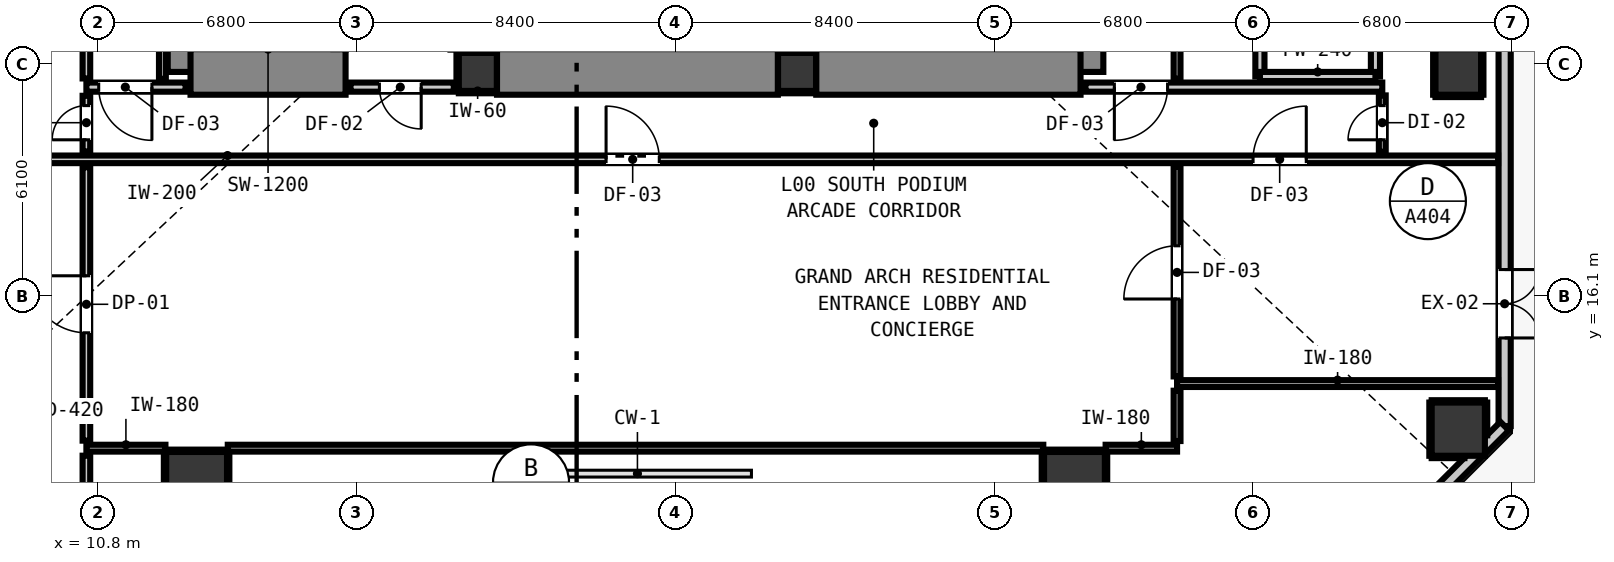
"""IFC4 building model, lengths in metres.
Left out: names, types, materials, properties, quantities, classifications, styles, units other than length and angle.
Written with IfcOpenShell. Run it as: python <this file> out.ifc"""

import sys

from ifc_helpers import new_model, si_unit, direction, frame, frame_2d, origin, origin_2d, place, context, subcontext, project, spatial, rectangle, circle, extrude, element, fill, save


model = new_model("IFC4")
c1 = context("Model", 3, precision=1e-05, world=origin(), true_north=direction((0.0, 1.0)))
c2 = subcontext(c1, "Body", "Model", "MODEL_VIEW")
j1 = project(units=[si_unit("LENGTHUNIT", "METRE"), si_unit("PLANEANGLEUNIT", "RADIAN")], contexts=[c1])
p1 = place(None, origin())
s1 = spatial("IfcSite", under=j1, at=p1, CompositionType="ELEMENT")
p2 = place(p1, origin())
s2 = spatial("IfcBuilding", under=s1, at=p2, CompositionType="ELEMENT")
p3 = place(p2, origin())
s3 = spatial("IfcBuildingStorey", under=s2, at=p3, CompositionType="ELEMENT", Elevation=0.0)
for number, where, z_axis, x_axis in (
    (1, (20.8, 22.0, 0.0), (0.0, 0.0, 1.0), (1.0, 0.0, 0.0)),
    (2, (29.2, 22.0, 0.0), (0.0, 0.0, 1.0), (1.0, 0.0, 0.0)),
):
    element("IfcColumn", number, at=place(p3, frame(where, z_axis=z_axis, x_axis=x_axis)), inside=s3, PredefinedType="COLUMN", context=c2, shape_type="SweptSolid", body=[
        extrude(rectangle(XDim=1.0, YDim=1.0, at=origin_2d()), origin(), (0.0, 0.0, 1.0), 5.2),
    ])
p4 = place(p3, frame((13.24, 22.0, 0.0), z_axis=(0.0, 0.0, 1.0), x_axis=(0.0, 1.0, 0.0)))
e3 = element("IfcWall", 3, at=p4, inside=s3, PredefinedType="SHEAR", context=c2, shape_type="SweptSolid", body=[
    extrude(rectangle(XDim=8.195, YDim=1.2, at=frame_2d((4.098, 0.0))), origin(), (0.0, 0.0, 1.0), 5.2),
])
p5 = place(p3, frame((13.24, 22.0, 0.0), z_axis=(0.0, 0.0, 1.0), x_axis=(1.0, 0.0, 0.0)))
e4 = element("IfcWall", 4, at=p5, inside=s3, PredefinedType="SHEAR", context=c2, shape_type="SweptSolid", body=[
    extrude(rectangle(XDim=4.08, YDim=1.2, at=frame_2d((2.04, 0.0))), origin(), (0.0, 0.0, 1.0), 5.2),
])
p6 = place(p3, frame((36.66, 22.0, 0.0), z_axis=(0.0, 0.0, 1.0), x_axis=(0.0, 1.0, 0.0)))
e5 = element("IfcWall", 5, at=p6, inside=s3, PredefinedType="SHEAR", context=c2, shape_type="SweptSolid", body=[
    extrude(rectangle(XDim=8.195, YDim=1.2, at=frame_2d((4.098, 0.0))), origin(), (0.0, 0.0, 1.0), 5.2),
])
p7 = place(p3, frame((29.705, 22.0, 0.0), z_axis=(0.0, 0.0, 1.0), x_axis=(1.0, 0.0, 0.0)))
e6 = element("IfcWall", 6, at=p7, inside=s3, PredefinedType="SHEAR", context=c2, shape_type="SweptSolid", body=[
    extrude(rectangle(XDim=6.955, YDim=1.2, at=frame_2d((3.478, 0.0))), origin(), (0.0, 0.0, 1.0), 5.2),
])
p8 = place(p3, frame((21.305, 22.0, 0.0), z_axis=(0.0, 0.0, 1.0), x_axis=(1.0, 0.0, 0.0)))
e7 = element("IfcWall", 7, at=p8, inside=s3, PredefinedType="SHEAR", context=c2, shape_type="SweptSolid", body=[
    extrude(rectangle(XDim=7.39, YDim=1.2, at=frame_2d((3.695, 0.0))), origin(), (0.0, 0.0, 1.0), 5.2),
])
for number, where, z_axis, x_axis in (
    (8, (13.4, 11.2, 0.0), (0.0, 0.0, 1.0), (1.0, 0.0, 0.0)),
    (9, (36.5, 11.2, 0.0), (0.0, 0.0, 1.0), (1.0, 0.0, 0.0)),
):
    element("IfcColumn", number, at=place(p3, frame(where, z_axis=z_axis, x_axis=x_axis)), inside=s3, PredefinedType="COLUMN", context=c2, shape_type="SweptSolid", body=[
        extrude(rectangle(XDim=1.6, YDim=1.6, at=origin_2d()), origin(), (0.0, 0.0, 1.0), 5.2),
    ])
p9 = place(p3, frame((46.6, 22.0, 0.0), z_axis=(0.0, 0.0, 1.0), x_axis=(1.0, 0.0, 0.0)))
e10 = element("IfcColumn", 10, at=p9, inside=s3, PredefinedType="COLUMN", context=c2, shape_type="SweptSolid", body=[
    extrude(circle(Radius=0.6, at=origin_2d()), origin(), (0.0, 0.0, 1.0), 5.2),
])
p10 = place(p3, frame((46.6, 12.6, 0.0), z_axis=(0.0, 0.0, 1.0), x_axis=(1.0, 0.0, 0.0)))
e11 = element("IfcColumn", 11, at=p10, inside=s3, PredefinedType="COLUMN", context=c2, shape_type="SweptSolid", body=[
    extrude(rectangle(XDim=1.4, YDim=1.4, at=origin_2d()), origin(), (0.0, 0.0, 1.0), 5.2),
])
p11 = place(p3, frame((47.82, 23.0, 0.0), z_axis=(0.0, 0.0, 1.0), x_axis=(0.0, -1.0, 0.0)))
e12 = element("IfcWall", 12, at=p11, inside=s3, PredefinedType="STANDARD", context=c2, shape_type="SweptSolid", body=[
    extrude(rectangle(XDim=10.32, YDim=0.32, at=frame_2d((5.16, 0.0))), origin(), (0.0, 0.0, 1.0), 4.92),
])
p12 = place(p11, frame((6.2, 0.0, 0.0)))
e13 = element("IfcOpeningElement", 13, at=p12, cuts=e12, PredefinedType="OPENING", context=c2, shape_type="SweptSolid", body=[
    extrude(rectangle(XDim=1.8, YDim=2.4, at=frame_2d((0.9, 1.2))), frame((0.0, 0.17, 0.0), z_axis=(0.0, -1.0, 0.0), x_axis=(1.0, 0.0, 0.0)), (0.0, 0.0, 1.0), 0.34),
])
p13 = place(p3, frame((47.82, 12.68, 0.0), z_axis=(0.0, 0.0, 1.0), x_axis=(-0.707106781187, -0.707106781187, 0.0)))
e14 = element("IfcWall", 14, at=p13, inside=s3, PredefinedType="STANDARD", context=c2, shape_type="SweptSolid", body=[
    extrude(rectangle(XDim=3.536, YDim=0.32, at=frame_2d((1.768, 0.0))), origin(), (0.0, 0.0, 1.0), 4.92),
])
for number, where, z_axis, x_axis in (
    (15, (41.38, 21.88, 0.0), (0.0, 0.0, 1.0), (0.0, 1.0, 0.0)),
    (16, (44.42, 21.88, 0.0), (0.0, 0.0, 1.0), (0.0, 1.0, 0.0)),
):
    element("IfcWall", number, at=place(p3, frame(where, z_axis=z_axis, x_axis=x_axis)), inside=s3, PredefinedType="PARAPET", context=c2, shape_type="SweptSolid", body=[
        extrude(rectangle(XDim=28.77, YDim=0.24, at=frame_2d((14.385, 0.0))), origin(), (0.0, 0.0, 1.0), 1.2),
    ])
p14 = place(p3, frame((41.38, 21.88, 0.0), z_axis=(0.0, 0.0, 1.0), x_axis=(1.0, 0.0, 0.0)))
e17 = element("IfcWall", 17, at=p14, inside=s3, PredefinedType="PARAPET", context=c2, shape_type="SweptSolid", body=[
    extrude(rectangle(XDim=3.04, YDim=0.24, at=frame_2d((1.52, 0.0))), origin(), (0.0, 0.0, 1.0), 1.2),
])
p15 = place(p3, frame((44.6, 21.6, 0.0), z_axis=(0.0, 0.0, 1.0), x_axis=(-1.0, 0.0, 0.0)))
e18 = element("IfcWall", 18, at=p15, inside=s3, PredefinedType="PARTITIONING", context=c2, shape_type="SweptSolid", body=[
    extrude(rectangle(XDim=7.81, YDim=0.24, at=frame_2d((3.905, 0.0))), origin(), (0.0, 0.0, 1.0), 4.155),
])
p16 = place(p15, frame((5.65, 0.0, 0.0)))
e19 = element("IfcOpeningElement", 19, at=p16, cuts=e18, PredefinedType="OPENING", context=c2, shape_type="SweptSolid", body=[
    extrude(rectangle(XDim=1.4, YDim=2.15, at=frame_2d((0.7, 1.075))), frame((0.0, 0.13, 0.0), z_axis=(0.0, -1.0, 0.0), x_axis=(1.0, 0.0, 0.0)), (0.0, 0.0, 1.0), 0.26),
])
p17 = place(p3, frame((20.168, 21.6, 0.0), z_axis=(0.0, 0.0, 1.0), x_axis=(-1.0, 0.0, 0.0)))
e20 = element("IfcWall", 20, at=p17, inside=s3, PredefinedType="PARTITIONING", context=c2, shape_type="SweptSolid", body=[
    extrude(rectangle(XDim=2.718, YDim=0.24, at=frame_2d((1.359, 0.0))), origin(), (0.0, 0.0, 1.0), 4.155),
])
p18 = place(p17, frame((0.858, 0.0, 0.0)))
e21 = element("IfcOpeningElement", 21, at=p18, cuts=e20, PredefinedType="OPENING", context=c2, shape_type="SweptSolid", body=[
    extrude(rectangle(XDim=1.1, YDim=2.15, at=frame_2d((0.55, 1.075))), frame((0.0, 0.13, 0.0), z_axis=(0.0, -1.0, 0.0), x_axis=(1.0, 0.0, 0.0)), (0.0, 0.0, 1.0), 0.26),
])
p19 = place(p3, frame((13.11, 21.6, 0.0), z_axis=(0.0, 0.0, 1.0), x_axis=(-1.0, 0.0, 0.0)))
e22 = element("IfcWall", 22, at=p19, inside=s3, PredefinedType="PARTITIONING", context=c2, shape_type="SweptSolid", body=[
    extrude(rectangle(XDim=2.61, YDim=0.24, at=frame_2d((1.305, 0.0))), origin(), (0.0, 0.0, 1.0), 4.155),
])
p20 = place(p19, frame((0.886, 0.0, 0.0)))
e23 = element("IfcOpeningElement", 23, at=p20, cuts=e22, PredefinedType="OPENING", context=c2, shape_type="SweptSolid", body=[
    extrude(rectangle(XDim=1.4, YDim=2.15, at=frame_2d((0.7, 1.075))), frame((0.0, 0.13, 0.0), z_axis=(0.0, -1.0, 0.0), x_axis=(1.0, 0.0, 0.0)), (0.0, 0.0, 1.0), 0.26),
])
p21 = place(p3, frame((4.352, 19.7, 0.0), z_axis=(0.0, 0.0, 1.0), x_axis=(1.0, 0.0, 0.0)))
e24 = element("IfcWall", 24, at=p21, inside=s3, PredefinedType="PARTITIONING", context=c2, shape_type="SweptSolid", body=[
    extrude(rectangle(XDim=43.296, YDim=0.2, at=frame_2d((21.648, 0.0))), origin(), (0.0, 0.0, 1.0), 4.92),
])
p22 = place(p21, frame((19.823, 0.0, 0.0)))
e25 = element("IfcOpeningElement", 25, at=p22, cuts=e24, PredefinedType="OPENING", context=c2, shape_type="SweptSolid", body=[
    extrude(rectangle(XDim=1.4, YDim=2.15, at=frame_2d((0.7, 1.075))), frame((0.0, 0.11, 0.0), z_axis=(0.0, -1.0, 0.0), x_axis=(1.0, 0.0, 0.0)), (0.0, 0.0, 1.0), 0.22),
])
p23 = place(p21, frame((36.848, 0.0, 0.0)))
e26 = element("IfcOpeningElement", 26, at=p23, cuts=e24, PredefinedType="OPENING", context=c2, shape_type="SweptSolid", body=[
    extrude(rectangle(XDim=1.4, YDim=2.15, at=frame_2d((0.7, 1.075))), frame((0.0, 0.11, 0.0), z_axis=(0.0, -1.0, 0.0), x_axis=(1.0, 0.0, 0.0)), (0.0, 0.0, 1.0), 0.22),
])
p24 = place(p3, frame((10.5, 12.1, 0.0), z_axis=(0.0, 0.0, 1.0), x_axis=(1.0, 0.0, 0.0)))
e27 = element("IfcWall", 27, at=p24, inside=s3, PredefinedType="PARTITIONING", context=c2, shape_type="SweptSolid", body=[
    extrude(rectangle(XDim=2.08, YDim=0.18, at=frame_2d((1.04, 0.0))), origin(), (0.0, 0.0, 1.0), 4.92),
])
p25 = place(p3, frame((14.22, 12.1, 0.0), z_axis=(0.0, 0.0, 1.0), x_axis=(1.0, 0.0, 0.0)))
e28 = element("IfcWall", 28, at=p25, inside=s3, PredefinedType="PARTITIONING", context=c2, shape_type="SweptSolid", body=[
    extrude(rectangle(XDim=21.46, YDim=0.18, at=frame_2d((10.73, 0.0))), origin(), (0.0, 0.0, 1.0), 4.92),
])
p26 = place(p3, frame((37.32, 12.1, 0.0), z_axis=(0.0, 0.0, 1.0), x_axis=(1.0, 0.0, 0.0)))
e29 = element("IfcWall", 29, at=p26, inside=s3, PredefinedType="PARTITIONING", context=c2, shape_type="SweptSolid", body=[
    extrude(rectangle(XDim=1.88, YDim=0.18, at=frame_2d((0.94, 0.0))), origin(), (0.0, 0.0, 1.0), 4.92),
])
p27 = place(p3, frame((39.2, 13.8, 0.0), z_axis=(0.0, 0.0, 1.0), x_axis=(1.0, 0.0, 0.0)))
e30 = element("IfcWall", 30, at=p27, inside=s3, PredefinedType="PARTITIONING", context=c2, shape_type="SweptSolid", body=[
    extrude(rectangle(XDim=8.448, YDim=0.18, at=frame_2d((4.224, 0.0))), origin(), (0.0, 0.0, 1.0), 4.92),
])
p28 = place(p3, frame((10.5, 10.352, 0.0), z_axis=(0.0, 0.0, 1.0), x_axis=(0.0, 1.0, 0.0)))
e31 = element("IfcWall", 31, at=p28, inside=s3, PredefinedType="PARTITIONING", context=c2, shape_type="SweptSolid", body=[
    extrude(rectangle(XDim=1.55, YDim=0.2, at=frame_2d((0.775, 0.0))), origin(), (0.0, 0.0, 1.0), 4.92),
])
p29 = place(p3, frame((10.5, 12.298, 0.0), z_axis=(0.0, 0.0, 1.0), x_axis=(0.0, 1.0, 0.0)))
e32 = element("IfcWall", 32, at=p29, inside=s3, PredefinedType="PARTITIONING", context=c2, shape_type="SweptSolid", body=[
    extrude(rectangle(XDim=7.194, YDim=0.2, at=frame_2d((3.597, 0.0))), origin(), (0.0, 0.0, 1.0), 4.92),
])
p30 = place(p29, frame((2.838, 0.0, 0.0)))
e33 = element("IfcOpeningElement", 33, at=p30, cuts=e32, PredefinedType="OPENING", context=c2, shape_type="SweptSolid", body=[
    extrude(rectangle(XDim=1.5, YDim=2.15, at=frame_2d((0.75, 1.075))), frame((0.0, 0.11, 0.0), z_axis=(0.0, -1.0, 0.0), x_axis=(1.0, 0.0, 0.0)), (0.0, 0.0, 1.0), 0.22),
])
p31 = place(p3, frame((10.5, 19.908, 0.0), z_axis=(0.0, 0.0, 1.0), x_axis=(0.0, 1.0, 0.0)))
e34 = element("IfcWall", 34, at=p31, inside=s3, PredefinedType="PARTITIONING", context=c2, shape_type="SweptSolid", body=[
    extrude(rectangle(XDim=1.464, YDim=0.2, at=frame_2d((0.732, 0.0))), origin(), (0.0, 0.0, 1.0), 4.92),
])
p32 = place(p31, frame((0.306, 0.0, 0.0)))
e35 = element("IfcOpeningElement", 35, at=p32, cuts=e34, PredefinedType="OPENING", context=c2, shape_type="SweptSolid", body=[
    extrude(rectangle(XDim=0.9, YDim=2.1, at=frame_2d((0.45, 1.05))), frame((0.0, 0.11, 0.0), z_axis=(0.0, -1.0, 0.0), x_axis=(1.0, 0.0, 0.0)), (0.0, 0.0, 1.0), 0.22),
])
p33 = place(p3, frame((10.5, 21.828, 0.0), z_axis=(0.0, 0.0, 1.0), x_axis=(0.0, 1.0, 0.0)))
e36 = element("IfcWall", 36, at=p33, inside=s3, PredefinedType="PARTITIONING", context=c2, shape_type="SweptSolid", body=[
    extrude(rectangle(XDim=5.204, YDim=0.2, at=frame_2d((2.602, 0.0))), origin(), (0.0, 0.0, 1.0), 4.92),
])
p34 = place(p3, frame((12.5, 21.818, 0.0), z_axis=(0.0, 0.0, 1.0), x_axis=(0.0, 1.0, 0.0)))
e37 = element("IfcWall", 37, at=p34, inside=s3, PredefinedType="PARTITIONING", context=c2, shape_type="SweptSolid", body=[
    extrude(rectangle(XDim=17.794, YDim=0.18, at=frame_2d((8.897, 0.0))), origin(), (0.0, 0.0, 1.0), 4.92),
])
p35 = place(p3, frame((39.2, 12.288, 0.0), z_axis=(0.0, 0.0, 1.0), x_axis=(0.0, 1.0, 0.0)))
e38 = element("IfcWall", 38, at=p35, inside=s3, PredefinedType="PARTITIONING", context=c2, shape_type="SweptSolid", body=[
    extrude(rectangle(XDim=1.324, YDim=0.18, at=frame_2d((0.662, 0.0))), origin(), (0.0, 0.0, 1.0), 4.92),
])
p36 = place(p3, frame((39.2, 13.988, 0.0), z_axis=(0.0, 0.0, 1.0), x_axis=(0.0, 1.0, 0.0)))
e39 = element("IfcWall", 39, at=p36, inside=s3, PredefinedType="PARTITIONING", context=c2, shape_type="SweptSolid", body=[
    extrude(rectangle(XDim=5.514, YDim=0.18, at=frame_2d((2.757, 0.0))), origin(), (0.0, 0.0, 1.0), 4.92),
])
p37 = place(p36, frame((2.037, 0.0, 0.0)))
e40 = element("IfcOpeningElement", 40, at=p37, cuts=e39, PredefinedType="OPENING", context=c2, shape_type="SweptSolid", body=[
    extrude(rectangle(XDim=1.4, YDim=2.15, at=frame_2d((0.7, 1.075))), frame((0.0, 0.1, 0.0), z_axis=(0.0, -1.0, 0.0), x_axis=(1.0, 0.0, 0.0)), (0.0, 0.0, 1.0), 0.2),
])
p38 = place(p3, frame((39.2, 21.818, 0.0), z_axis=(0.0, 0.0, 1.0), x_axis=(0.0, 1.0, 0.0)))
e41 = element("IfcWall", 41, at=p38, inside=s3, PredefinedType="PARTITIONING", context=c2, shape_type="SweptSolid", body=[
    extrude(rectangle(XDim=17.794, YDim=0.18, at=frame_2d((8.897, 0.0))), origin(), (0.0, 0.0, 1.0), 4.92),
])
p39 = place(p3, frame((44.6, 19.898, 0.0), z_axis=(0.0, 0.0, 1.0), x_axis=(0.0, 1.0, 0.0)))
e42 = element("IfcWall", 42, at=p39, inside=s3, PredefinedType="PARTITIONING", context=c2, shape_type="SweptSolid", body=[
    extrude(rectangle(XDim=1.484, YDim=0.18, at=frame_2d((0.742, 0.0))), origin(), (0.0, 0.0, 1.0), 4.92),
])
p40 = place(p39, frame((0.316, 0.0, 0.0)))
e43 = element("IfcOpeningElement", 43, at=p40, cuts=e42, PredefinedType="OPENING", context=c2, shape_type="SweptSolid", body=[
    extrude(rectangle(XDim=0.9, YDim=2.1, at=frame_2d((0.45, 1.05))), frame((0.0, 0.1, 0.0), z_axis=(0.0, -1.0, 0.0), x_axis=(1.0, 0.0, 0.0)), (0.0, 0.0, 1.0), 0.2),
])
for number, where, z_axis, x_axis in (
    (44, (20.3, 21.468, 0.0), (0.0, 0.0, 1.0), (1.0, 0.0, 0.0)),
    (45, (20.3, 22.532, 0.0), (0.0, 0.0, 1.0), (1.0, 0.0, 0.0)),
):
    element("IfcWall", number, at=place(p3, frame(where, z_axis=z_axis, x_axis=x_axis)), inside=s3, PredefinedType="PARTITIONING", context=c2, shape_type="SweptSolid", body=[
        extrude(rectangle(XDim=0.99, YDim=0.06, at=frame_2d((0.495, 0.0))), origin(), (0.0, 0.0, 1.0), 1.45),
    ])
p41 = place(p3, frame((20.268, 21.5, 0.0), z_axis=(0.0, 0.0, 1.0), x_axis=(0.0, 1.0, 0.0)))
e46 = element("IfcWall", 46, at=p41, inside=s3, PredefinedType="PARTITIONING", context=c2, shape_type="SweptSolid", body=[
    extrude(rectangle(XDim=1.0, YDim=0.06, at=frame_2d((0.5, 0.0))), origin(), (0.0, 0.0, 1.0), 1.45),
])
for number, where, z_axis, x_axis in (
    (47, (28.71, 21.468, 0.0), (0.0, 0.0, 1.0), (1.0, 0.0, 0.0)),
    (48, (28.71, 22.532, 0.0), (0.0, 0.0, 1.0), (1.0, 0.0, 0.0)),
):
    element("IfcWall", number, at=place(p3, frame(where, z_axis=z_axis, x_axis=x_axis)), inside=s3, PredefinedType="PARTITIONING", context=c2, shape_type="SweptSolid", body=[
        extrude(rectangle(XDim=0.98, YDim=0.06, at=frame_2d((0.49, 0.0))), origin(), (0.0, 0.0, 1.0), 1.45),
    ])
p42 = place(p3, frame((12.6, 12.032, 0.0), z_axis=(0.0, 0.0, 1.0), x_axis=(1.0, 0.0, 0.0)))
e49 = element("IfcWall", 49, at=p42, inside=s3, PredefinedType="PARTITIONING", context=c2, shape_type="SweptSolid", body=[
    extrude(rectangle(XDim=1.6, YDim=0.06, at=frame_2d((0.8, 0.0))), origin(), (0.0, 0.0, 1.0), 1.45),
])
for number, where, z_axis, x_axis in (
    (50, (12.568, 10.4, 0.0), (0.0, 0.0, 1.0), (0.0, 1.0, 0.0)),
    (51, (14.232, 10.4, 0.0), (0.0, 0.0, 1.0), (0.0, 1.0, 0.0)),
    (52, (35.7, 12.032, 0.0), (0.0, 0.0, 1.0), (1.0, 0.0, 0.0)),
    (53, (35.668, 10.4, 0.0), (0.0, 0.0, 1.0), (0.0, 1.0, 0.0)),
    (54, (37.332, 10.4, 0.0), (0.0, 0.0, 1.0), (0.0, 1.0, 0.0)),
):
    element("IfcWall", number, at=place(p3, frame(where, z_axis=z_axis, x_axis=x_axis)), inside=s3, PredefinedType="PARTITIONING", context=c2, shape_type="SweptSolid", body=[
        extrude(rectangle(XDim=1.6, YDim=0.06, at=frame_2d((0.8, 0.0))), origin(), (0.0, 0.0, 1.0), 1.45),
    ])
p43 = place(p3, frame((46.0, 21.368, 0.0), z_axis=(0.0, 0.0, 1.0), x_axis=(1.0, 0.0, 0.0)))
e55 = element("IfcWall", 55, at=p43, inside=s3, PredefinedType="PARTITIONING", context=c2, shape_type="SweptSolid", body=[
    extrude(rectangle(XDim=1.2, YDim=0.06, at=frame_2d((0.6, 0.0))), origin(), (0.0, 0.0, 1.0), 1.45),
])
for number, where, z_axis, x_axis in (
    (56, (45.968, 21.4, 0.0), (0.0, 0.0, 1.0), (0.0, 1.0, 0.0)),
    (57, (47.232, 21.4, 0.0), (0.0, 0.0, 1.0), (0.0, 1.0, 0.0)),
):
    element("IfcWall", number, at=place(p3, frame(where, z_axis=z_axis, x_axis=x_axis)), inside=s3, PredefinedType="PARTITIONING", context=c2, shape_type="SweptSolid", body=[
        extrude(rectangle(XDim=1.2, YDim=0.06, at=frame_2d((0.6, 0.0))), origin(), (0.0, 0.0, 1.0), 1.45),
    ])
p44 = place(p3, frame((45.9, 11.868, 0.0), z_axis=(0.0, 0.0, 1.0), x_axis=(1.0, 0.0, 0.0)))
e58 = element("IfcWall", 58, at=p44, inside=s3, PredefinedType="PARTITIONING", context=c2, shape_type="SweptSolid", body=[
    extrude(rectangle(XDim=0.861, YDim=0.06, at=frame_2d((0.431, 0.0))), origin(), (0.0, 0.0, 1.0), 1.45),
])
for number, where, z_axis, x_axis in (
    (59, (45.9, 13.332, 0.0), (0.0, 0.0, 1.0), (1.0, 0.0, 0.0)),
    (60, (45.868, 11.9, 0.0), (0.0, 0.0, 1.0), (0.0, 1.0, 0.0)),
):
    element("IfcWall", number, at=place(p3, frame(where, z_axis=z_axis, x_axis=x_axis)), inside=s3, PredefinedType="PARTITIONING", context=c2, shape_type="SweptSolid", body=[
        extrude(rectangle(XDim=1.4, YDim=0.06, at=frame_2d((0.7, 0.0))), origin(), (0.0, 0.0, 1.0), 1.45),
    ])
p45 = place(p3, frame((47.332, 12.439, 0.0), z_axis=(0.0, 0.0, 1.0), x_axis=(0.0, 1.0, 0.0)))
e61 = element("IfcWall", 61, at=p45, inside=s3, PredefinedType="PARTITIONING", context=c2, shape_type="SweptSolid", body=[
    extrude(rectangle(XDim=0.861, YDim=0.06, at=frame_2d((0.431, 0.0))), origin(), (0.0, 0.0, 1.0), 1.45),
])
p46 = place(p12, origin())
e62 = element("IfcDoor", 62, at=p46, inside=s3, OperationType="DOUBLE_DOOR_SINGLE_SWING", PredefinedType="DOOR", context=c2, shape_type="SweptSolid", body=[
    extrude(rectangle(XDim=1.8, YDim=2.4, at=frame_2d((0.9, 1.2))), frame((0.0, 0.025, 0.0), z_axis=(0.0, -1.0, 0.0), x_axis=(1.0, 0.0, 0.0)), (0.0, 0.0, 1.0), 0.05),
])
fill(e13, e62)
p47 = place(p18, origin())
e63 = element("IfcDoor", 63, at=p47, inside=s3, OperationType="SINGLE_SWING_LEFT", PredefinedType="DOOR", context=c2, shape_type="SweptSolid", body=[
    extrude(rectangle(XDim=1.1, YDim=2.15, at=frame_2d((0.55, 1.075))), frame((0.0, 0.025, 0.0), z_axis=(0.0, -1.0, 0.0), x_axis=(1.0, 0.0, 0.0)), (0.0, 0.0, 1.0), 0.05),
])
fill(e21, e63)
p48 = place(p20, origin())
e64 = element("IfcDoor", 64, at=p48, inside=s3, OperationType="SINGLE_SWING_LEFT", PredefinedType="DOOR", context=c2, shape_type="SweptSolid", body=[
    extrude(rectangle(XDim=1.4, YDim=2.15, at=frame_2d((0.7, 1.075))), frame((0.0, 0.025, 0.0), z_axis=(0.0, -1.0, 0.0), x_axis=(1.0, 0.0, 0.0)), (0.0, 0.0, 1.0), 0.05),
])
fill(e23, e64)
p49 = place(p16, origin())
e65 = element("IfcDoor", 65, at=p49, inside=s3, OperationType="SINGLE_SWING_RIGHT", PredefinedType="DOOR", context=c2, shape_type="SweptSolid", body=[
    extrude(rectangle(XDim=1.4, YDim=2.15, at=frame_2d((0.7, 1.075))), frame((0.0, 0.025, 0.0), z_axis=(0.0, -1.0, 0.0), x_axis=(1.0, 0.0, 0.0)), (0.0, 0.0, 1.0), 0.05),
])
fill(e19, e65)
p50 = place(p22, origin())
e66 = element("IfcDoor", 66, at=p50, inside=s3, OperationType="SINGLE_SWING_LEFT", PredefinedType="DOOR", context=c2, shape_type="SweptSolid", body=[
    extrude(rectangle(XDim=1.4, YDim=2.15, at=frame_2d((0.7, 1.075))), frame((0.0, 0.025, 0.0), z_axis=(0.0, -1.0, 0.0), x_axis=(1.0, 0.0, 0.0)), (0.0, 0.0, 1.0), 0.05),
])
fill(e25, e66)
p51 = place(p23, origin())
e67 = element("IfcDoor", 67, at=p51, inside=s3, OperationType="SINGLE_SWING_RIGHT", PredefinedType="DOOR", context=c2, shape_type="SweptSolid", body=[
    extrude(rectangle(XDim=1.4, YDim=2.15, at=frame_2d((0.7, 1.075))), frame((0.0, 0.025, 0.0), z_axis=(0.0, -1.0, 0.0), x_axis=(1.0, 0.0, 0.0)), (0.0, 0.0, 1.0), 0.05),
])
fill(e26, e67)
p52 = place(p37, origin())
e68 = element("IfcDoor", 68, at=p52, inside=s3, OperationType="SINGLE_SWING_LEFT", PredefinedType="DOOR", context=c2, shape_type="SweptSolid", body=[
    extrude(rectangle(XDim=1.4, YDim=2.15, at=frame_2d((0.7, 1.075))), frame((0.0, 0.025, 0.0), z_axis=(0.0, -1.0, 0.0), x_axis=(1.0, 0.0, 0.0)), (0.0, 0.0, 1.0), 0.05),
])
fill(e40, e68)
p53 = place(p30, origin())
e69 = element("IfcDoor", 69, at=p53, inside=s3, OperationType="SINGLE_SWING_RIGHT", PredefinedType="DOOR", context=c2, shape_type="SweptSolid", body=[
    extrude(rectangle(XDim=1.5, YDim=2.15, at=frame_2d((0.75, 1.075))), frame((0.0, 0.025, 0.0), z_axis=(0.0, -1.0, 0.0), x_axis=(1.0, 0.0, 0.0)), (0.0, 0.0, 1.0), 0.05),
])
fill(e33, e69)
p54 = place(p32, origin())
e70 = element("IfcDoor", 70, at=p54, inside=s3, OperationType="SINGLE_SWING_LEFT", PredefinedType="DOOR", context=c2, shape_type="SweptSolid", body=[
    extrude(rectangle(XDim=0.9, YDim=2.1, at=frame_2d((0.45, 1.05))), frame((0.0, 0.025, 0.0), z_axis=(0.0, -1.0, 0.0), x_axis=(1.0, 0.0, 0.0)), (0.0, 0.0, 1.0), 0.05),
])
fill(e35, e70)
p55 = place(p40, origin())
e71 = element("IfcDoor", 71, at=p55, inside=s3, OperationType="SINGLE_SWING_LEFT", PredefinedType="DOOR", context=c2, shape_type="SweptSolid", body=[
    extrude(rectangle(XDim=0.9, YDim=2.1, at=frame_2d((0.45, 1.05))), frame((0.0, 0.025, 0.0), z_axis=(0.0, -1.0, 0.0), x_axis=(1.0, 0.0, 0.0)), (0.0, 0.0, 1.0), 0.05),
])
fill(e43, e71)
save(model, sys.argv[1])
